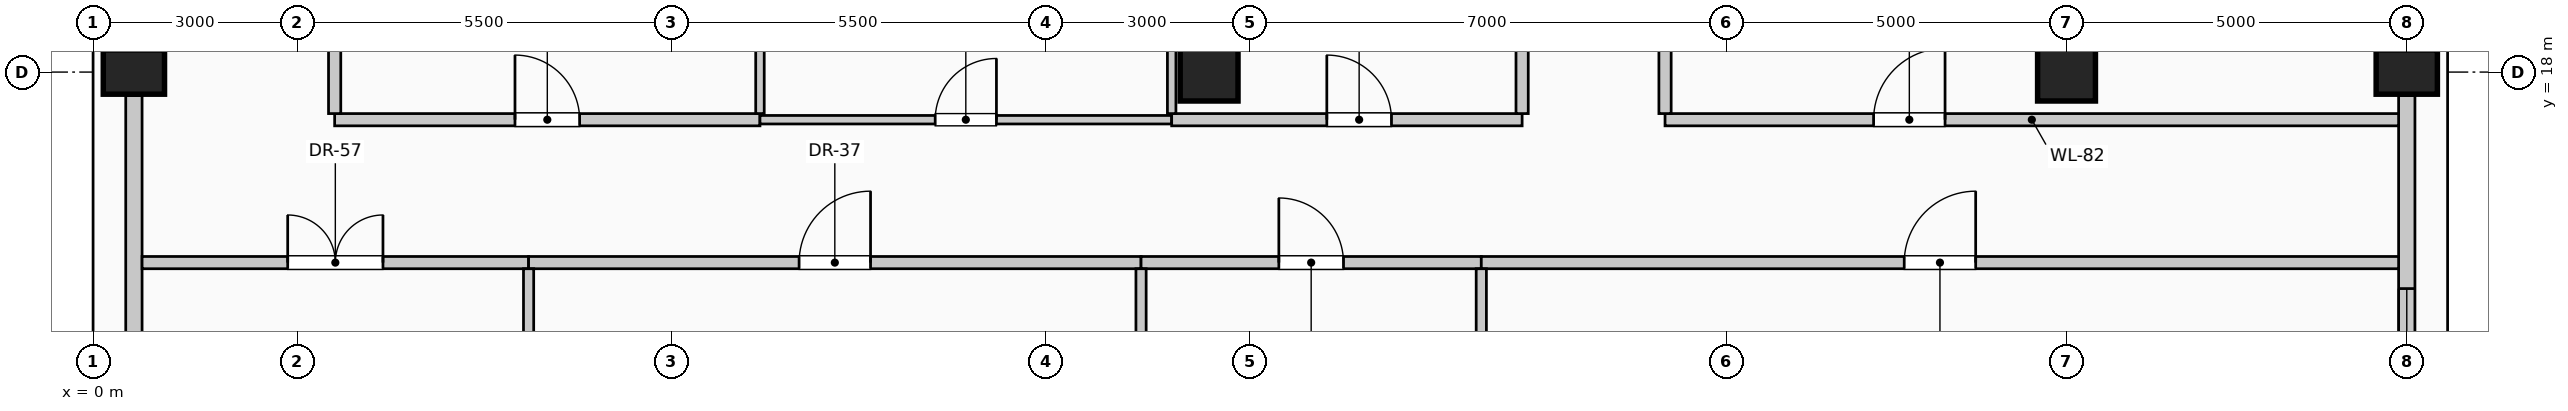
"""IFC4 building model, lengths in metres.
Left out: names, types, materials, properties, quantities, classifications, styles, units other than length and angle.
Written with IfcOpenShell. Run it as: python <this file> out.ifc"""

import sys

from ifc_helpers import new_model, si_unit, direction, frame, frame_2d, origin, origin_2d, place, context, subcontext, project, spatial, rectangle, circle, extrude, element, fill, save


model = new_model("IFC4")
c1 = context("Model", 3, precision=1e-05, world=origin(), true_north=direction((0.0, 1.0)))
c2 = subcontext(c1, "Body", "Model", "MODEL_VIEW")
j1 = project(units=[si_unit("LENGTHUNIT", "METRE"), si_unit("PLANEANGLEUNIT", "RADIAN")], contexts=[c1])
p1 = place(None, origin())
s1 = spatial("IfcSite", under=j1, at=p1, CompositionType="ELEMENT")
p2 = place(p1, origin())
s2 = spatial("IfcBuilding", under=s1, at=p2, CompositionType="ELEMENT")
p3 = place(p2, frame((0.0, 0.0, 313.0)))
s3 = spatial("IfcBuildingStorey", under=s2, at=p3, CompositionType="ELEMENT", Elevation=313.0)
for number, where, z_axis, x_axis in (
    (1, (0.6, 18.0, 0.0), (0.0, 0.0, 1.0), (0.0, 1.0, 0.0)),
    (2, (34.0, 18.0, 0.0), (0.0, 0.0, 1.0), (0.0, 1.0, 0.0)),
):
    element("IfcColumn", number, at=place(p3, frame(where, z_axis=z_axis, x_axis=x_axis)), inside=s3, PredefinedType="COLUMN", context=c2, shape_type="SweptSolid", body=[
        extrude(rectangle(XDim=0.65, YDim=0.9, at=origin_2d()), origin(), (0.0, 0.0, 1.0), 4.8),
    ])
for number, where, z_axis, x_axis in (
    (3, (16.4, 18.0, 0.0), (0.0, 0.0, 1.0), (1.0, 0.0, 0.0)),
    (4, (29.0, 18.0, 0.0), (0.0, 0.0, 1.0), (1.0, 0.0, 0.0)),
):
    element("IfcColumn", number, at=place(p3, frame(where, z_axis=z_axis, x_axis=x_axis)), inside=s3, PredefinedType="COLUMN", context=c2, shape_type="SweptSolid", body=[
        extrude(circle(Radius=0.425, at=origin_2d()), origin(), (0.0, 0.0, 1.0), 4.8),
    ])
p4 = place(p3, frame((0.6, 10.345, 0.0), z_axis=(0.0, 0.0, 1.0), x_axis=(0.0, 1.0, 0.0)))
e5 = element("IfcWall", 5, at=p4, inside=s3, PredefinedType="SOLIDWALL", context=c2, shape_type="SweptSolid", body=[
    extrude(rectangle(XDim=7.31, YDim=0.24, at=frame_2d((3.655, 0.0))), origin(), (0.0, 0.0, 1.0), 3.71),
])
p5 = place(p4, frame((0.703, 0.0, 0.35)))
e6 = element("IfcOpeningElement", 6, at=p5, cuts=e5, PredefinedType="OPENING", context=c2, shape_type="SweptSolid", body=[
    extrude(rectangle(XDim=2.6, YDim=2.4, at=frame_2d((1.3, 1.2))), frame((0.0, 0.13, 0.0), z_axis=(0.0, -1.0, 0.0), x_axis=(1.0, 0.0, 0.0)), (0.0, 0.0, 1.0), 0.26),
])
p6 = place(p3, frame((34.0, 17.655, 0.0), z_axis=(0.0, 0.0, 1.0), x_axis=(0.0, -1.0, 0.0)))
e7 = element("IfcWall", 7, at=p6, inside=s3, PredefinedType="SOLIDWALL", context=c2, shape_type="SweptSolid", body=[
    extrude(rectangle(XDim=13.71, YDim=0.24, at=frame_2d((6.855, 0.0))), origin(), (0.0, 0.0, 1.0), 3.78),
])
p7 = place(p6, frame((2.837, 0.0, 0.35)))
e8 = element("IfcOpeningElement", 8, at=p7, cuts=e7, PredefinedType="OPENING", context=c2, shape_type="SweptSolid", body=[
    extrude(rectangle(XDim=2.6, YDim=2.4, at=frame_2d((1.3, 1.2))), frame((0.0, 0.13, 0.0), z_axis=(0.0, -1.0, 0.0), x_axis=(1.0, 0.0, 0.0)), (0.0, 0.0, 1.0), 0.26),
])
p8 = place(p6, frame((8.273, 0.0, 0.35)))
e9 = element("IfcOpeningElement", 9, at=p8, cuts=e7, PredefinedType="OPENING", context=c2, shape_type="SweptSolid", body=[
    extrude(rectangle(XDim=2.6, YDim=2.4, at=frame_2d((1.3, 1.2))), frame((0.0, 0.13, 0.0), z_axis=(0.0, -1.0, 0.0), x_axis=(1.0, 0.0, 0.0)), (0.0, 0.0, 1.0), 0.26),
])
p9 = place(p3, frame((0.72, 15.2, 0.0), z_axis=(0.0, 0.0, 1.0), x_axis=(1.0, 0.0, 0.0)))
e10 = element("IfcWall", 10, at=p9, inside=s3, PredefinedType="PARTITIONING", context=c2, shape_type="SweptSolid", body=[
    extrude(rectangle(XDim=5.68, YDim=0.18, at=frame_2d((2.84, 0.0))), origin(), (0.0, 0.0, 1.0), 4.46),
])
p10 = place(p9, frame((2.14, 0.0, 0.0)))
e11 = element("IfcOpeningElement", 11, at=p10, cuts=e10, PredefinedType="OPENING", context=c2, shape_type="SweptSolid", body=[
    extrude(rectangle(XDim=1.4, YDim=2.2, at=frame_2d((0.7, 1.1))), frame((0.0, 0.1, 0.0), z_axis=(0.0, -1.0, 0.0), x_axis=(1.0, 0.0, 0.0)), (0.0, 0.0, 1.0), 0.2),
])
p11 = place(p3, frame((6.4, 15.2, 0.0), z_axis=(0.0, 0.0, 1.0), x_axis=(1.0, 0.0, 0.0)))
e12 = element("IfcWall", 12, at=p11, inside=s3, PredefinedType="PARTITIONING", context=c2, shape_type="SweptSolid", body=[
    extrude(rectangle(XDim=9.0, YDim=0.18, at=frame_2d((4.5, 0.0))), origin(), (0.0, 0.0, 1.0), 4.46),
])
p12 = place(p11, frame((3.975, 0.0, 0.0)))
e13 = element("IfcOpeningElement", 13, at=p12, cuts=e12, PredefinedType="OPENING", context=c2, shape_type="SweptSolid", body=[
    extrude(rectangle(XDim=1.05, YDim=2.15, at=frame_2d((0.525, 1.075))), frame((0.0, 0.1, 0.0), z_axis=(0.0, -1.0, 0.0), x_axis=(1.0, 0.0, 0.0)), (0.0, 0.0, 1.0), 0.2),
])
p13 = place(p3, frame((15.4, 15.2, 0.0), z_axis=(0.0, 0.0, 1.0), x_axis=(1.0, 0.0, 0.0)))
e14 = element("IfcWall", 14, at=p13, inside=s3, PredefinedType="PARTITIONING", context=c2, shape_type="SweptSolid", body=[
    extrude(rectangle(XDim=5.0, YDim=0.18, at=frame_2d((2.5, 0.0))), origin(), (0.0, 0.0, 1.0), 4.46),
])
p14 = place(p13, frame((2.025, 0.0, 0.0)))
e15 = element("IfcOpeningElement", 15, at=p14, cuts=e14, PredefinedType="OPENING", context=c2, shape_type="SweptSolid", body=[
    extrude(rectangle(XDim=0.95, YDim=2.15, at=frame_2d((0.475, 1.075))), frame((0.0, 0.1, 0.0), z_axis=(0.0, -1.0, 0.0), x_axis=(1.0, 0.0, 0.0)), (0.0, 0.0, 1.0), 0.2),
])
p15 = place(p3, frame((20.4, 15.2, 0.0), z_axis=(0.0, 0.0, 1.0), x_axis=(1.0, 0.0, 0.0)))
e16 = element("IfcWall", 16, at=p15, inside=s3, PredefinedType="PARTITIONING", context=c2, shape_type="SweptSolid", body=[
    extrude(rectangle(XDim=13.48, YDim=0.18, at=frame_2d((6.74, 0.0))), origin(), (0.0, 0.0, 1.0), 4.46),
])
p16 = place(p15, frame((6.215, 0.0, 0.0)))
e17 = element("IfcOpeningElement", 17, at=p16, cuts=e16, PredefinedType="OPENING", context=c2, shape_type="SweptSolid", body=[
    extrude(rectangle(XDim=1.05, YDim=2.15, at=frame_2d((0.525, 1.075))), frame((0.0, 0.1, 0.0), z_axis=(0.0, -1.0, 0.0), x_axis=(1.0, 0.0, 0.0)), (0.0, 0.0, 1.0), 0.2),
])
p17 = place(p3, frame((3.55, 17.3, 0.0), z_axis=(0.0, 0.0, 1.0), x_axis=(1.0, 0.0, 0.0)))
e18 = element("IfcWall", 18, at=p17, inside=s3, PredefinedType="PARTITIONING", context=c2, shape_type="SweptSolid", body=[
    extrude(rectangle(XDim=6.25, YDim=0.18, at=frame_2d((3.125, 0.0))), origin(), (0.0, 0.0, 1.0), 4.46),
])
p18 = place(p17, frame((2.65, 0.0, 0.0)))
e19 = element("IfcOpeningElement", 19, at=p18, cuts=e18, PredefinedType="OPENING", context=c2, shape_type="SweptSolid", body=[
    extrude(rectangle(XDim=0.95, YDim=2.15, at=frame_2d((0.475, 1.075))), frame((0.0, 0.1, 0.0), z_axis=(0.0, -1.0, 0.0), x_axis=(1.0, 0.0, 0.0)), (0.0, 0.0, 1.0), 0.2),
])
p19 = place(p3, frame((9.8, 17.3, 0.0), z_axis=(0.0, 0.0, 1.0), x_axis=(1.0, 0.0, 0.0)))
e20 = element("IfcWall", 20, at=p19, inside=s3, PredefinedType="PARTITIONING", context=c2, shape_type="SweptSolid", body=[
    extrude(rectangle(XDim=6.05, YDim=0.125, at=frame_2d((3.025, 0.0))), origin(), (0.0, 0.0, 1.0), 4.46),
])
p20 = place(p19, frame((2.575, 0.0, 0.0)))
e21 = element("IfcOpeningElement", 21, at=p20, cuts=e20, PredefinedType="OPENING", context=c2, shape_type="SweptSolid", body=[
    extrude(rectangle(XDim=0.9, YDim=2.1, at=frame_2d((0.45, 1.05))), frame((0.0, 0.073, 0.0), z_axis=(0.0, -1.0, 0.0), x_axis=(1.0, 0.0, 0.0)), (0.0, 0.0, 1.0), 0.145),
])
p21 = place(p3, frame((15.85, 17.3, 0.0), z_axis=(0.0, 0.0, 1.0), x_axis=(1.0, 0.0, 0.0)))
e22 = element("IfcWall", 22, at=p21, inside=s3, PredefinedType="PARTITIONING", context=c2, shape_type="SweptSolid", body=[
    extrude(rectangle(XDim=5.15, YDim=0.18, at=frame_2d((2.575, 0.0))), origin(), (0.0, 0.0, 1.0), 2.855),
])
p22 = place(p21, frame((2.28, 0.0, 0.0)))
e23 = element("IfcOpeningElement", 23, at=p22, cuts=e22, PredefinedType="OPENING", context=c2, shape_type="SweptSolid", body=[
    extrude(rectangle(XDim=0.95, YDim=2.15, at=frame_2d((0.475, 1.075))), frame((0.0, 0.1, 0.0), z_axis=(0.0, -1.0, 0.0), x_axis=(1.0, 0.0, 0.0)), (0.0, 0.0, 1.0), 0.2),
])
p23 = place(p3, frame((23.1, 17.3, 0.0), z_axis=(0.0, 0.0, 1.0), x_axis=(1.0, 0.0, 0.0)))
e24 = element("IfcWall", 24, at=p23, inside=s3, PredefinedType="PARTITIONING", context=c2, shape_type="SweptSolid", body=[
    extrude(rectangle(XDim=10.78, YDim=0.18, at=frame_2d((5.39, 0.0))), origin(), (0.0, 0.0, 1.0), 2.855),
])
p24 = place(p23, frame((3.065, 0.0, 0.0)))
e25 = element("IfcOpeningElement", 25, at=p24, cuts=e24, PredefinedType="OPENING", context=c2, shape_type="SweptSolid", body=[
    extrude(rectangle(XDim=1.05, YDim=2.15, at=frame_2d((0.525, 1.075))), frame((0.0, 0.1, 0.0), z_axis=(0.0, -1.0, 0.0), x_axis=(1.0, 0.0, 0.0)), (0.0, 0.0, 1.0), 0.2),
])
p25 = place(p3, frame((3.55, 17.39, 0.0), z_axis=(0.0, 0.0, 1.0), x_axis=(0.0, 1.0, 0.0)))
e26 = element("IfcWall", 26, at=p25, inside=s3, PredefinedType="PARTITIONING", context=c2, shape_type="SweptSolid", body=[
    extrude(rectangle(XDim=7.335, YDim=0.18, at=frame_2d((3.667, 0.0))), origin(), (0.0, 0.0, 1.0), 4.46),
])
p26 = place(p3, frame((6.4, 0.72, 0.0), z_axis=(0.0, 0.0, 1.0), x_axis=(0.0, 1.0, 0.0)))
e27 = element("IfcWall", 27, at=p26, inside=s3, PredefinedType="PARTITIONING", context=c2, shape_type="SweptSolid", body=[
    extrude(rectangle(XDim=14.39, YDim=0.15, at=frame_2d((7.195, 0.0))), origin(), (0.0, 0.0, 1.0), 4.46),
])
p27 = place(p3, frame((9.8, 17.39, 0.0), z_axis=(0.0, 0.0, 1.0), x_axis=(0.0, 1.0, 0.0)))
e28 = element("IfcWall", 28, at=p27, inside=s3, PredefinedType="PARTITIONING", context=c2, shape_type="SweptSolid", body=[
    extrude(rectangle(XDim=7.335, YDim=0.125, at=frame_2d((3.667, 0.0))), origin(), (0.0, 0.0, 1.0), 4.46),
])
p28 = place(p3, frame((15.4, 0.72, 0.0), z_axis=(0.0, 0.0, 1.0), x_axis=(0.0, 1.0, 0.0)))
e29 = element("IfcWall", 29, at=p28, inside=s3, PredefinedType="PARTITIONING", context=c2, shape_type="SweptSolid", body=[
    extrude(rectangle(XDim=14.39, YDim=0.15, at=frame_2d((7.195, 0.0))), origin(), (0.0, 0.0, 1.0), 4.46),
])
p29 = place(p3, frame((15.85, 17.39, 0.0), z_axis=(0.0, 0.0, 1.0), x_axis=(0.0, 1.0, 0.0)))
e30 = element("IfcWall", 30, at=p29, inside=s3, PredefinedType="PARTITIONING", context=c2, shape_type="SweptSolid", body=[
    extrude(rectangle(XDim=7.335, YDim=0.125, at=frame_2d((3.667, 0.0))), origin(), (0.0, 0.0, 1.0), 4.46),
])
p30 = place(p3, frame((20.4, 0.72, 0.0), z_axis=(0.0, 0.0, 1.0), x_axis=(0.0, 1.0, 0.0)))
e31 = element("IfcWall", 31, at=p30, inside=s3, PredefinedType="PARTITIONING", context=c2, shape_type="SweptSolid", body=[
    extrude(rectangle(XDim=14.39, YDim=0.15, at=frame_2d((7.195, 0.0))), origin(), (0.0, 0.0, 1.0), 4.46),
])
p31 = place(p3, frame((21.0, 17.39, 0.0), z_axis=(0.0, 0.0, 1.0), x_axis=(0.0, 1.0, 0.0)))
e32 = element("IfcWall", 32, at=p31, inside=s3, PredefinedType="PARTITIONING", context=c2, shape_type="SweptSolid", body=[
    extrude(rectangle(XDim=7.335, YDim=0.18, at=frame_2d((3.667, 0.0))), origin(), (0.0, 0.0, 1.0), 4.46),
])
p32 = place(p3, frame((23.1, 17.39, 0.0), z_axis=(0.0, 0.0, 1.0), x_axis=(0.0, 1.0, 0.0)))
e33 = element("IfcWall", 33, at=p32, inside=s3, PredefinedType="PARTITIONING", context=c2, shape_type="SweptSolid", body=[
    extrude(rectangle(XDim=8.735, YDim=0.18, at=frame_2d((4.368, 0.0))), origin(), (0.0, 0.0, 1.0), 4.46),
])
p33 = place(p7, origin())
e34 = element("IfcWindow", 34, at=p33, inside=s3, PartitioningType="SINGLE_PANEL", PredefinedType="WINDOW", context=c2, shape_type="SweptSolid", body=[
    extrude(rectangle(XDim=2.6, YDim=2.4, at=frame_2d((1.3, 1.2))), frame((0.0, 0.03, 0.0), z_axis=(0.0, -1.0, 0.0), x_axis=(1.0, 0.0, 0.0)), (0.0, 0.0, 1.0), 0.06),
])
fill(e8, e34)
p34 = place(p10, origin())
e35 = element("IfcDoor", 35, at=p34, inside=s3, OperationType="DOUBLE_DOOR_SINGLE_SWING", PredefinedType="DOOR", context=c2, shape_type="SweptSolid", body=[
    extrude(rectangle(XDim=1.4, YDim=2.2, at=frame_2d((0.7, 1.1))), frame((0.0, 0.025, 0.0), z_axis=(0.0, -1.0, 0.0), x_axis=(1.0, 0.0, 0.0)), (0.0, 0.0, 1.0), 0.05),
])
fill(e11, e35)
p35 = place(p12, origin())
e36 = element("IfcDoor", 36, at=p35, inside=s3, OperationType="SINGLE_SWING_RIGHT", PredefinedType="DOOR", context=c2, shape_type="SweptSolid", body=[
    extrude(rectangle(XDim=1.05, YDim=2.15, at=frame_2d((0.525, 1.075))), frame((0.0, 0.025, 0.0), z_axis=(0.0, -1.0, 0.0), x_axis=(1.0, 0.0, 0.0)), (0.0, 0.0, 1.0), 0.05),
])
fill(e13, e36)
p36 = place(p14, origin())
e37 = element("IfcDoor", 37, at=p36, inside=s3, OperationType="SINGLE_SWING_LEFT", PredefinedType="DOOR", context=c2, shape_type="SweptSolid", body=[
    extrude(rectangle(XDim=0.95, YDim=2.15, at=frame_2d((0.475, 1.075))), frame((0.0, 0.025, 0.0), z_axis=(0.0, -1.0, 0.0), x_axis=(1.0, 0.0, 0.0)), (0.0, 0.0, 1.0), 0.05),
])
fill(e15, e37)
p37 = place(p16, origin())
e38 = element("IfcDoor", 38, at=p37, inside=s3, OperationType="SINGLE_SWING_RIGHT", PredefinedType="DOOR", context=c2, shape_type="SweptSolid", body=[
    extrude(rectangle(XDim=1.05, YDim=2.15, at=frame_2d((0.525, 1.075))), frame((0.0, 0.025, 0.0), z_axis=(0.0, -1.0, 0.0), x_axis=(1.0, 0.0, 0.0)), (0.0, 0.0, 1.0), 0.05),
])
fill(e17, e38)
p38 = place(p18, origin())
e39 = element("IfcDoor", 39, at=p38, inside=s3, OperationType="SINGLE_SWING_LEFT", PredefinedType="DOOR", context=c2, shape_type="SweptSolid", body=[
    extrude(rectangle(XDim=0.95, YDim=2.15, at=frame_2d((0.475, 1.075))), frame((0.0, 0.025, 0.0), z_axis=(0.0, -1.0, 0.0), x_axis=(1.0, 0.0, 0.0)), (0.0, 0.0, 1.0), 0.05),
])
fill(e19, e39)
p39 = place(p20, origin())
e40 = element("IfcDoor", 40, at=p39, inside=s3, OperationType="SINGLE_SWING_RIGHT", PredefinedType="DOOR", context=c2, shape_type="SweptSolid", body=[
    extrude(rectangle(XDim=0.9, YDim=2.1, at=frame_2d((0.45, 1.05))), frame((0.0, 0.025, 0.0), z_axis=(0.0, -1.0, 0.0), x_axis=(1.0, 0.0, 0.0)), (0.0, 0.0, 1.0), 0.05),
])
fill(e21, e40)
p40 = place(p22, origin())
e41 = element("IfcDoor", 41, at=p40, inside=s3, OperationType="SINGLE_SWING_LEFT", PredefinedType="DOOR", context=c2, shape_type="SweptSolid", body=[
    extrude(rectangle(XDim=0.95, YDim=2.15, at=frame_2d((0.475, 1.075))), frame((0.0, 0.025, 0.0), z_axis=(0.0, -1.0, 0.0), x_axis=(1.0, 0.0, 0.0)), (0.0, 0.0, 1.0), 0.05),
])
fill(e23, e41)
p41 = place(p24, origin())
e42 = element("IfcDoor", 42, at=p41, inside=s3, OperationType="SINGLE_SWING_RIGHT", PredefinedType="DOOR", context=c2, shape_type="SweptSolid", body=[
    extrude(rectangle(XDim=1.05, YDim=2.15, at=frame_2d((0.525, 1.075))), frame((0.0, 0.025, 0.0), z_axis=(0.0, -1.0, 0.0), x_axis=(1.0, 0.0, 0.0)), (0.0, 0.0, 1.0), 0.05),
])
fill(e25, e42)
save(model, sys.argv[1])
